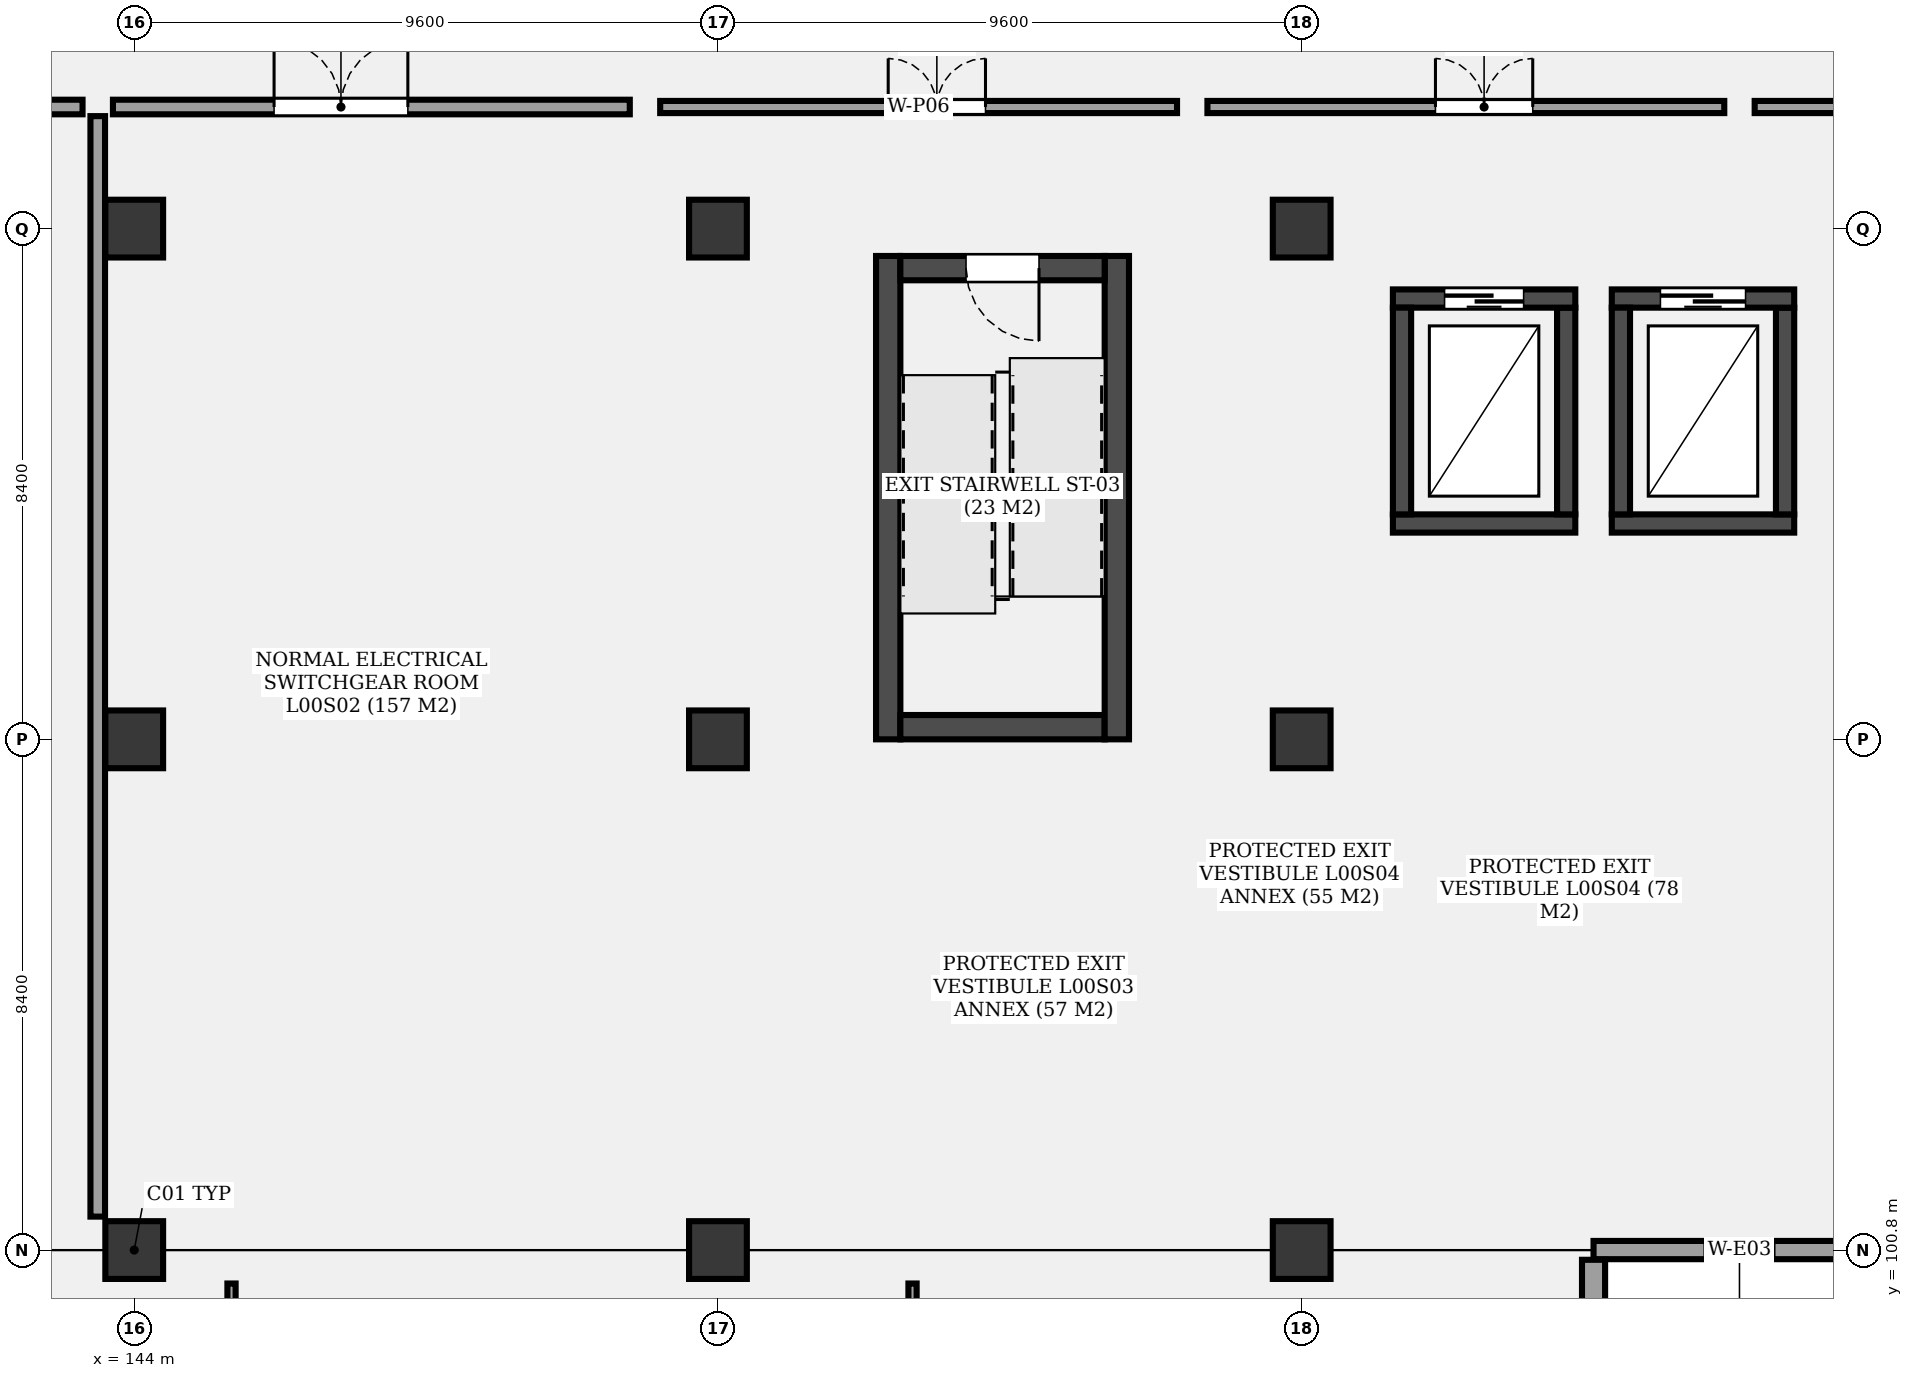
"""IFC4 building model, lengths in metres.
Left out: names, types, materials, properties, quantities, classifications, styles, units other than length and angle.
Written with IfcOpenShell. Run it as: python <this file> out.ifc"""

import sys

from ifc_helpers import new_model, si_unit, direction, frame, frame_2d, origin, origin_2d, place, context, subcontext, project, spatial, rectangle, extrude, element, fill, save


model = new_model("IFC4")
c1 = context("Model", 3, precision=1e-05, world=origin(), true_north=direction((0.0, 1.0)))
c2 = subcontext(c1, "Body", "Model", "MODEL_VIEW")
j1 = project(units=[si_unit("LENGTHUNIT", "METRE"), si_unit("PLANEANGLEUNIT", "RADIAN")], contexts=[c1])
p1 = place(None, origin())
s1 = spatial("IfcSite", under=j1, at=p1, CompositionType="ELEMENT")
p2 = place(p1, origin())
s2 = spatial("IfcBuilding", under=s1, at=p2, CompositionType="ELEMENT")
p3 = place(p2, origin())
s3 = spatial("IfcBuildingStorey", under=s2, at=p3, CompositionType="ELEMENT", Elevation=0.0)
for number, where, z_axis, x_axis in (
    (1, (144.0, 100.8, -0.35), (0.0, 0.0, 1.0), (1.0, 0.0, 0.0)),
    (2, (144.0, 109.2, -0.35), (0.0, 0.0, 1.0), (1.0, 0.0, 0.0)),
    (3, (144.0, 117.6, -0.35), (0.0, 0.0, 1.0), (1.0, 0.0, 0.0)),
    (4, (153.6, 100.8, -0.35), (0.0, 0.0, 1.0), (1.0, 0.0, 0.0)),
    (5, (153.6, 109.2, -0.35), (0.0, 0.0, 1.0), (1.0, 0.0, 0.0)),
    (6, (153.6, 117.6, -0.35), (0.0, 0.0, 1.0), (1.0, 0.0, 0.0)),
    (7, (163.2, 100.8, -0.35), (0.0, 0.0, 1.0), (1.0, 0.0, 0.0)),
    (8, (163.2, 109.2, -0.35), (0.0, 0.0, 1.0), (1.0, 0.0, 0.0)),
    (9, (163.2, 117.6, -0.35), (0.0, 0.0, 1.0), (1.0, 0.0, 0.0)),
):
    element("IfcColumn", number, at=place(p3, frame(where, z_axis=z_axis, x_axis=x_axis)), inside=s3, PredefinedType="COLUMN", context=c2, shape_type="SweptSolid", body=[
        extrude(rectangle(XDim=0.95, YDim=0.95, at=origin_2d()), origin(), (0.0, 0.0, 1.0), 5.45),
    ])
p4 = place(p3, frame((156.4, 117.15, 0.0), z_axis=(0.0, 0.0, 1.0), x_axis=(0.0, -1.0, 0.0)))
e10 = element("IfcWall", 10, at=p4, inside=s3, PredefinedType="SHEAR", context=c2, shape_type="SweptSolid", body=[
    extrude(rectangle(XDim=7.95, YDim=0.4, at=frame_2d((3.975, 0.0))), origin(), (0.0, 0.0, 1.0), 5.1),
])
p5 = place(p3, frame((156.6, 109.4, 0.0), z_axis=(0.0, 0.0, 1.0), x_axis=(1.0, 0.0, 0.0)))
e11 = element("IfcWall", 11, at=p5, inside=s3, PredefinedType="SHEAR", context=c2, shape_type="SweptSolid", body=[
    extrude(rectangle(XDim=3.36, YDim=0.4, at=frame_2d((1.68, 0.0))), origin(), (0.0, 0.0, 1.0), 5.1),
])
p6 = place(p3, frame((160.16, 109.2, 0.0), z_axis=(0.0, 0.0, 1.0), x_axis=(0.0, 1.0, 0.0)))
e12 = element("IfcWall", 12, at=p6, inside=s3, PredefinedType="SHEAR", context=c2, shape_type="SweptSolid", body=[
    extrude(rectangle(XDim=7.95, YDim=0.4, at=frame_2d((3.975, 0.0))), origin(), (0.0, 0.0, 1.0), 5.1),
])
p7 = place(p3, frame((159.96, 116.95, 0.0), z_axis=(0.0, 0.0, 1.0), x_axis=(-1.0, 0.0, 0.0)))
e13 = element("IfcWall", 13, at=p7, inside=s3, PredefinedType="SHEAR", context=c2, shape_type="SweptSolid", body=[
    extrude(rectangle(XDim=3.36, YDim=0.4, at=frame_2d((1.68, 0.0))), origin(), (0.0, 0.0, 1.0), 5.1),
])
p8 = place(p7, frame((1.08, 0.0, 0.0)))
e14 = element("IfcOpeningElement", 14, at=p8, cuts=e13, PredefinedType="OPENING", context=c2, shape_type="SweptSolid", body=[
    extrude(rectangle(XDim=1.2, YDim=2.2, at=frame_2d((0.6, 1.1))), frame((0.0, 0.21, 0.0), z_axis=(0.0, -1.0, 0.0), x_axis=(1.0, 0.0, 0.0)), (0.0, 0.0, 1.0), 0.42),
])
p9 = place(p3, frame((164.7, 112.75, 0.0), z_axis=(0.0, 0.0, 1.0), x_axis=(1.0, 0.0, 0.0)))
e15 = element("IfcWall", 15, at=p9, inside=s3, PredefinedType="SHEAR", context=c2, shape_type="SweptSolid", body=[
    extrude(rectangle(XDim=3.0, YDim=0.3, at=frame_2d((1.5, 0.0))), origin(), (0.0, 0.0, 1.0), 5.1),
])
p10 = place(p3, frame((167.55, 112.9, 0.0), z_axis=(0.0, 0.0, 1.0), x_axis=(0.0, 1.0, 0.0)))
e16 = element("IfcWall", 16, at=p10, inside=s3, PredefinedType="SHEAR", context=c2, shape_type="SweptSolid", body=[
    extrude(rectangle(XDim=3.4, YDim=0.3, at=frame_2d((1.7, 0.0))), origin(), (0.0, 0.0, 1.0), 5.1),
])
p11 = place(p3, frame((167.7, 116.45, 0.0), z_axis=(0.0, 0.0, 1.0), x_axis=(-1.0, 0.0, 0.0)))
e17 = element("IfcWall", 17, at=p11, inside=s3, PredefinedType="SHEAR", context=c2, shape_type="SweptSolid", body=[
    extrude(rectangle(XDim=3.0, YDim=0.3, at=frame_2d((1.5, 0.0))), origin(), (0.0, 0.0, 1.0), 5.1),
])
p12 = place(p11, frame((0.85, 0.0, 0.0)))
e18 = element("IfcOpeningElement", 18, at=p12, cuts=e17, PredefinedType="OPENING", context=c2, shape_type="SweptSolid", body=[
    extrude(rectangle(XDim=1.3, YDim=2.3, at=frame_2d((0.65, 1.15))), frame((0.0, 0.16, 0.0), z_axis=(0.0, -1.0, 0.0), x_axis=(1.0, 0.0, 0.0)), (0.0, 0.0, 1.0), 0.32),
])
p13 = place(p3, frame((164.85, 116.3, 0.0), z_axis=(0.0, 0.0, 1.0), x_axis=(0.0, -1.0, 0.0)))
e19 = element("IfcWall", 19, at=p13, inside=s3, PredefinedType="SHEAR", context=c2, shape_type="SweptSolid", body=[
    extrude(rectangle(XDim=3.4, YDim=0.3, at=frame_2d((1.7, 0.0))), origin(), (0.0, 0.0, 1.0), 5.1),
])
p14 = place(p3, frame((168.3, 112.75, 0.0), z_axis=(0.0, 0.0, 1.0), x_axis=(1.0, 0.0, 0.0)))
e20 = element("IfcWall", 20, at=p14, inside=s3, PredefinedType="SHEAR", context=c2, shape_type="SweptSolid", body=[
    extrude(rectangle(XDim=3.0, YDim=0.3, at=frame_2d((1.5, 0.0))), origin(), (0.0, 0.0, 1.0), 5.1),
])
p15 = place(p3, frame((171.15, 112.9, 0.0), z_axis=(0.0, 0.0, 1.0), x_axis=(0.0, 1.0, 0.0)))
e21 = element("IfcWall", 21, at=p15, inside=s3, PredefinedType="SHEAR", context=c2, shape_type="SweptSolid", body=[
    extrude(rectangle(XDim=3.4, YDim=0.3, at=frame_2d((1.7, 0.0))), origin(), (0.0, 0.0, 1.0), 5.1),
])
p16 = place(p3, frame((171.3, 116.45, 0.0), z_axis=(0.0, 0.0, 1.0), x_axis=(-1.0, 0.0, 0.0)))
e22 = element("IfcWall", 22, at=p16, inside=s3, PredefinedType="SHEAR", context=c2, shape_type="SweptSolid", body=[
    extrude(rectangle(XDim=3.0, YDim=0.3, at=frame_2d((1.5, 0.0))), origin(), (0.0, 0.0, 1.0), 5.1),
])
p17 = place(p16, frame((0.8, 0.0, 0.0)))
e23 = element("IfcOpeningElement", 23, at=p17, cuts=e22, PredefinedType="OPENING", context=c2, shape_type="SweptSolid", body=[
    extrude(rectangle(XDim=1.4, YDim=2.3, at=frame_2d((0.7, 1.15))), frame((0.0, 0.16, 0.0), z_axis=(0.0, -1.0, 0.0), x_axis=(1.0, 0.0, 0.0)), (0.0, 0.0, 1.0), 0.32),
])
p18 = place(p3, frame((168.45, 116.3, 0.0), z_axis=(0.0, 0.0, 1.0), x_axis=(0.0, -1.0, 0.0)))
e24 = element("IfcWall", 24, at=p18, inside=s3, PredefinedType="SHEAR", context=c2, shape_type="SweptSolid", body=[
    extrude(rectangle(XDim=3.4, YDim=0.3, at=frame_2d((1.7, 0.0))), origin(), (0.0, 0.0, 1.0), 5.1),
])
p19 = place(p3, frame((172.8, 100.8, 0.0), z_axis=(0.0, 0.0, 1.0), x_axis=(-1.0, 0.0, 0.0)))
e25 = element("IfcWall", 25, at=p19, inside=s3, PredefinedType="SOLIDWALL", context=c2, shape_type="SweptSolid", body=[
    extrude(rectangle(XDim=4.8, YDim=0.3, at=frame_2d((2.4, 0.0))), origin(), (0.0, 0.0, 1.0), 4.24),
])
p20 = place(p19, frame((1.825, 0.0, 0.85)))
e26 = element("IfcOpeningElement", 26, at=p20, cuts=e25, PredefinedType="OPENING", context=c2, shape_type="SweptSolid", body=[
    extrude(rectangle(XDim=1.15, YDim=1.2, at=frame_2d((0.575, 0.6))), frame((0.0, 0.16, 0.0), z_axis=(0.0, -1.0, 0.0), x_axis=(1.0, 0.0, 0.0)), (0.0, 0.0, 1.0), 0.32),
])
p21 = place(p3, frame((168.0, 100.64, 0.0), z_axis=(0.0, 0.0, 1.0), x_axis=(0.0, -1.0, 0.0)))
e27 = element("IfcWall", 27, at=p21, inside=s3, PredefinedType="SOLIDWALL", context=c2, shape_type="SweptSolid", body=[
    extrude(rectangle(XDim=3.88, YDim=0.38, at=frame_2d((1.94, 0.0))), origin(), (0.0, 0.0, 1.0), 4.24),
])
p22 = place(p3, frame((134.65, 119.6, 0.0), z_axis=(0.0, 0.0, 1.0), x_axis=(1.0, 0.0, 0.0)))
e28 = element("IfcWall", 28, at=p22, inside=s3, PredefinedType="PARTITIONING", context=c2, shape_type="SweptSolid", body=[
    extrude(rectangle(XDim=8.5, YDim=0.24, at=frame_2d((4.25, 0.0))), origin(), (0.0, 0.0, 1.0), 3.98),
])
p23 = place(p22, frame((2.65, 0.0, 0.0)))
e29 = element("IfcOpeningElement", 29, at=p23, cuts=e28, PredefinedType="OPENING", context=c2, shape_type="SweptSolid", body=[
    extrude(rectangle(XDim=2.2, YDim=2.4, at=frame_2d((1.1, 1.2))), frame((0.0, 0.13, 0.0), z_axis=(0.0, -1.0, 0.0), x_axis=(1.0, 0.0, 0.0)), (0.0, 0.0, 1.0), 0.26),
])
p24 = place(p3, frame((143.65, 119.6, 0.0), z_axis=(0.0, 0.0, 1.0), x_axis=(1.0, 0.0, 0.0)))
e30 = element("IfcWall", 30, at=p24, inside=s3, PredefinedType="PARTITIONING", context=c2, shape_type="SweptSolid", body=[
    extrude(rectangle(XDim=8.5, YDim=0.24, at=frame_2d((4.25, 0.0))), origin(), (0.0, 0.0, 1.0), 3.98),
])
p25 = place(p24, frame((2.65, 0.0, 0.0)))
e31 = element("IfcOpeningElement", 31, at=p25, cuts=e30, PredefinedType="OPENING", context=c2, shape_type="SweptSolid", body=[
    extrude(rectangle(XDim=2.2, YDim=2.4, at=frame_2d((1.1, 1.2))), frame((0.0, 0.13, 0.0), z_axis=(0.0, -1.0, 0.0), x_axis=(1.0, 0.0, 0.0)), (0.0, 0.0, 1.0), 0.26),
])
p26 = place(p3, frame((143.4, 101.35, 0.0), z_axis=(0.0, 0.0, 1.0), x_axis=(0.0, 1.0, 0.0)))
e32 = element("IfcWall", 32, at=p26, inside=s3, PredefinedType="PARTITIONING", context=c2, shape_type="SweptSolid", body=[
    extrude(rectangle(XDim=18.1, YDim=0.24, at=frame_2d((9.05, 0.0))), origin(), (0.0, 0.0, 1.0), 3.98),
])
p27 = place(p3, frame((152.65, 119.6, 0.0), z_axis=(0.0, 0.0, 1.0), x_axis=(1.0, 0.0, 0.0)))
e33 = element("IfcWall", 33, at=p27, inside=s3, PredefinedType="PARTITIONING", context=c2, shape_type="SweptSolid", body=[
    extrude(rectangle(XDim=8.5, YDim=0.2, at=frame_2d((4.25, 0.0))), origin(), (0.0, 0.0, 1.0), 3.98),
])
p28 = place(p27, frame((3.75, 0.0, 0.0)))
e34 = element("IfcOpeningElement", 34, at=p28, cuts=e33, PredefinedType="OPENING", context=c2, shape_type="SweptSolid", body=[
    extrude(rectangle(XDim=1.6, YDim=2.2, at=frame_2d((0.8, 1.1))), frame((0.0, 0.11, 0.0), z_axis=(0.0, -1.0, 0.0), x_axis=(1.0, 0.0, 0.0)), (0.0, 0.0, 1.0), 0.22),
])
p29 = place(p3, frame((161.65, 119.6, 0.0), z_axis=(0.0, 0.0, 1.0), x_axis=(1.0, 0.0, 0.0)))
e35 = element("IfcWall", 35, at=p29, inside=s3, PredefinedType="PARTITIONING", context=c2, shape_type="SweptSolid", body=[
    extrude(rectangle(XDim=8.5, YDim=0.2, at=frame_2d((4.25, 0.0))), origin(), (0.0, 0.0, 1.0), 3.98),
])
p30 = place(p29, frame((3.75, 0.0, 0.0)))
e36 = element("IfcOpeningElement", 36, at=p30, cuts=e35, PredefinedType="OPENING", context=c2, shape_type="SweptSolid", body=[
    extrude(rectangle(XDim=1.6, YDim=2.2, at=frame_2d((0.8, 1.1))), frame((0.0, 0.11, 0.0), z_axis=(0.0, -1.0, 0.0), x_axis=(1.0, 0.0, 0.0)), (0.0, 0.0, 1.0), 0.22),
])
p31 = place(p3, frame((170.65, 119.6, 0.0), z_axis=(0.0, 0.0, 1.0), x_axis=(1.0, 0.0, 0.0)))
e37 = element("IfcWall", 37, at=p31, inside=s3, PredefinedType="PARTITIONING", context=c2, shape_type="SweptSolid", body=[
    extrude(rectangle(XDim=8.5, YDim=0.2, at=frame_2d((4.25, 0.0))), origin(), (0.0, 0.0, 1.0), 3.98),
])
p32 = place(p31, frame((3.75, 0.0, 0.0)))
e38 = element("IfcOpeningElement", 38, at=p32, cuts=e37, PredefinedType="OPENING", context=c2, shape_type="SweptSolid", body=[
    extrude(rectangle(XDim=1.6, YDim=2.2, at=frame_2d((0.8, 1.1))), frame((0.0, 0.11, 0.0), z_axis=(0.0, -1.0, 0.0), x_axis=(1.0, 0.0, 0.0)), (0.0, 0.0, 1.0), 0.22),
])
for number, where, z_axis, x_axis in (
    (39, (145.6, 90.55, 0.0), (0.0, 0.0, 1.0), (0.0, 1.0, 0.0)),
    (40, (156.8, 90.55, 0.0), (0.0, 0.0, 1.0), (0.0, 1.0, 0.0)),
):
    element("IfcWall", number, at=place(p3, frame(where, z_axis=z_axis, x_axis=x_axis)), inside=s3, PredefinedType="PARTITIONING", context=c2, shape_type="SweptSolid", body=[
        extrude(rectangle(XDim=9.7, YDim=0.135, at=frame_2d((4.85, 0.0))), origin(), (0.0, 0.0, 1.0), 3.98),
    ])
p33 = place(p8, origin())
e41 = element("IfcDoor", 41, at=p33, inside=s3, OperationType="SINGLE_SWING_LEFT", PredefinedType="DOOR", context=c2, shape_type="SweptSolid", body=[
    extrude(rectangle(XDim=1.2, YDim=2.2, at=frame_2d((0.6, 1.1))), frame((0.0, 0.025, 0.0), z_axis=(0.0, -1.0, 0.0), x_axis=(1.0, 0.0, 0.0)), (0.0, 0.0, 1.0), 0.05),
])
fill(e14, e41)
p34 = place(p12, origin())
e42 = element("IfcDoor", 42, at=p34, inside=s3, OperationType="SLIDING_TO_LEFT", PredefinedType="DOOR", context=c2, shape_type="SweptSolid", body=[
    extrude(rectangle(XDim=1.3, YDim=2.3, at=frame_2d((0.65, 1.15))), frame((0.0, 0.025, 0.0), z_axis=(0.0, -1.0, 0.0), x_axis=(1.0, 0.0, 0.0)), (0.0, 0.0, 1.0), 0.05),
])
fill(e18, e42)
p35 = place(p17, origin())
e43 = element("IfcDoor", 43, at=p35, inside=s3, OperationType="SLIDING_TO_RIGHT", PredefinedType="DOOR", context=c2, shape_type="SweptSolid", body=[
    extrude(rectangle(XDim=1.4, YDim=2.3, at=frame_2d((0.7, 1.15))), frame((0.0, 0.025, 0.0), z_axis=(0.0, -1.0, 0.0), x_axis=(1.0, 0.0, 0.0)), (0.0, 0.0, 1.0), 0.05),
])
fill(e23, e43)
p36 = place(p20, origin())
e44 = element("IfcWindow", 44, at=p36, inside=s3, PartitioningType="SINGLE_PANEL", PredefinedType="WINDOW", context=c2, shape_type="SweptSolid", body=[
    extrude(rectangle(XDim=1.15, YDim=1.2, at=frame_2d((0.575, 0.6))), frame((0.0, 0.03, 0.0), z_axis=(0.0, -1.0, 0.0), x_axis=(1.0, 0.0, 0.0)), (0.0, 0.0, 1.0), 0.06),
])
fill(e26, e44)
p37 = place(p25, origin())
e45 = element("IfcDoor", 45, at=p37, inside=s3, OperationType="DOUBLE_DOOR_SINGLE_SWING", PredefinedType="DOOR", context=c2, shape_type="SweptSolid", body=[
    extrude(rectangle(XDim=2.2, YDim=2.4, at=frame_2d((1.1, 1.2))), frame((0.0, 0.025, 0.0), z_axis=(0.0, -1.0, 0.0), x_axis=(1.0, 0.0, 0.0)), (0.0, 0.0, 1.0), 0.05),
])
fill(e31, e45)
p38 = place(p28, origin())
e46 = element("IfcDoor", 46, at=p38, inside=s3, OperationType="DOUBLE_DOOR_SINGLE_SWING", PredefinedType="DOOR", context=c2, shape_type="SweptSolid", body=[
    extrude(rectangle(XDim=1.6, YDim=2.2, at=frame_2d((0.8, 1.1))), frame((0.0, 0.025, 0.0), z_axis=(0.0, -1.0, 0.0), x_axis=(1.0, 0.0, 0.0)), (0.0, 0.0, 1.0), 0.05),
])
fill(e34, e46)
p39 = place(p30, origin())
e47 = element("IfcDoor", 47, at=p39, inside=s3, OperationType="DOUBLE_DOOR_SINGLE_SWING", PredefinedType="DOOR", context=c2, shape_type="SweptSolid", body=[
    extrude(rectangle(XDim=1.6, YDim=2.2, at=frame_2d((0.8, 1.1))), frame((0.0, 0.025, 0.0), z_axis=(0.0, -1.0, 0.0), x_axis=(1.0, 0.0, 0.0)), (0.0, 0.0, 1.0), 0.05),
])
fill(e36, e47)
save(model, sys.argv[1])
